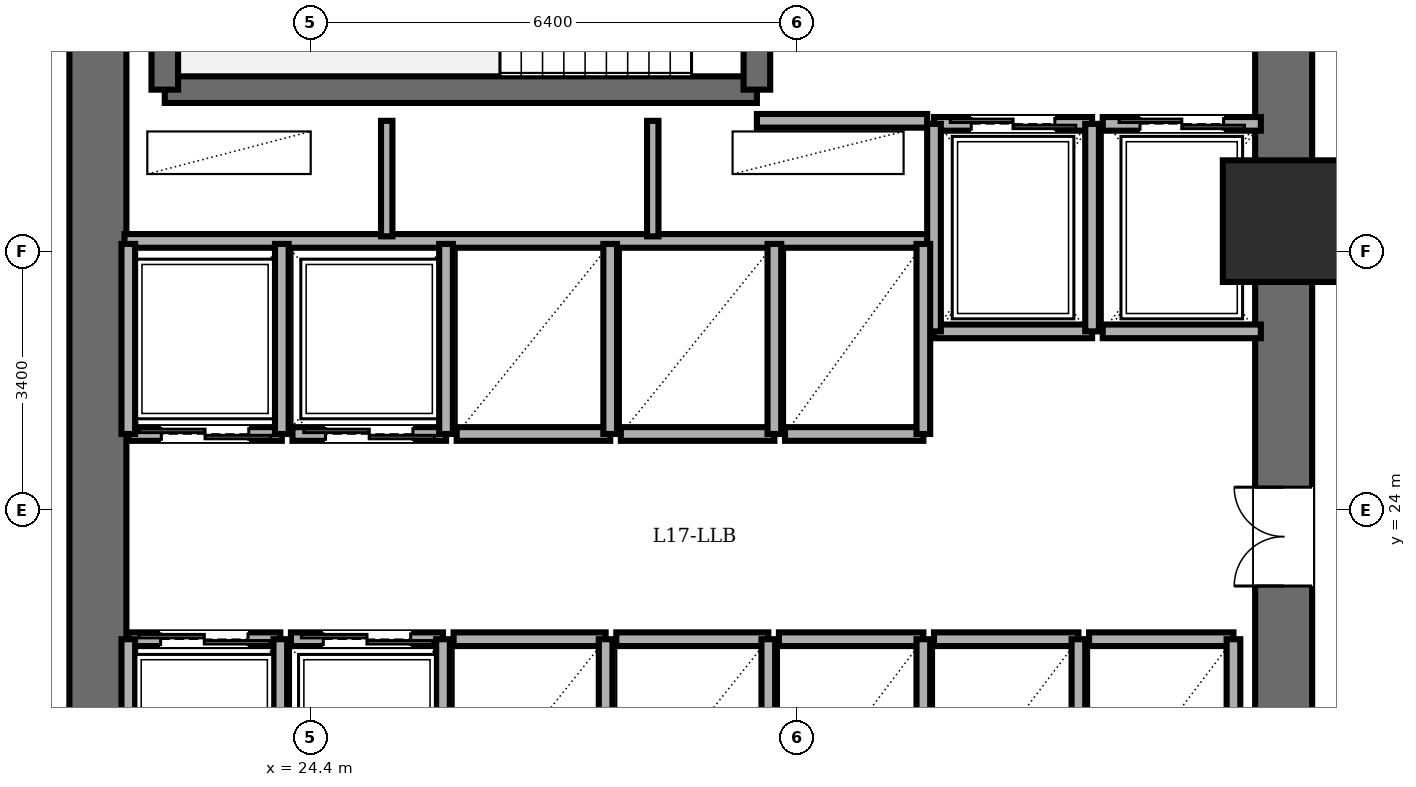
"""IFC4 building model, lengths in metres.
Left out: names, types, materials, properties, quantities, classifications, styles, units other than length and angle.
Written with IfcOpenShell. Run it as: python <this file> out.ifc"""

import sys

from ifc_helpers import new_model, si_unit, direction, frame, frame_2d, origin, origin_2d, place, context, subcontext, project, spatial, rectangle, extrude, element, fill, save


model = new_model("IFC4")
c1 = context("Model", 3, precision=1e-05, world=origin(), true_north=direction((0.0, 1.0)))
c2 = subcontext(c1, "Body", "Model", "MODEL_VIEW")
j1 = project(units=[si_unit("LENGTHUNIT", "METRE"), si_unit("PLANEANGLEUNIT", "RADIAN")], contexts=[c1])
p1 = place(None, origin())
s1 = spatial("IfcSite", under=j1, at=p1, CompositionType="ELEMENT")
p2 = place(p1, origin())
s2 = spatial("IfcBuilding", under=s1, at=p2, CompositionType="ELEMENT")
p3 = place(p2, frame((0.0, 0.0, 64.8)))
s3 = spatial("IfcBuildingStorey", under=s2, at=p3, CompositionType="ELEMENT", Elevation=64.8)
p4 = place(p3, frame((37.2, 27.8, 0.0), z_axis=(0.0, 0.0, 1.0), x_axis=(1.0, 0.0, 0.0)))
e1 = element("IfcColumn", 1, at=p4, inside=s3, PredefinedType="COLUMN", context=c2, shape_type="SweptSolid", body=[
    extrude(rectangle(XDim=1.6, YDim=1.6, at=origin_2d()), origin(), (0.0, 0.0, 1.0), 3.6),
])
p5 = place(p3, frame((21.6, 14.4, 0.0), z_axis=(0.0, 0.0, 1.0), x_axis=(0.0, 1.0, 0.0)))
e2 = element("IfcWall", 2, at=p5, inside=s3, PredefinedType="SHEAR", context=c2, shape_type="SweptSolid", body=[
    extrude(rectangle(XDim=19.2, YDim=0.75, at=frame_2d((9.6, 0.0))), origin(), (0.0, 0.0, 1.0), 3.4),
])
p6 = place(p3, frame((37.2, 14.4, 0.0), z_axis=(0.0, 0.0, 1.0), x_axis=(0.0, 1.0, 0.0)))
e3 = element("IfcWall", 3, at=p6, inside=s3, PredefinedType="SHEAR", context=c2, shape_type="SweptSolid", body=[
    extrude(rectangle(XDim=19.2, YDim=0.75, at=frame_2d((9.6, 0.0))), origin(), (0.0, 0.0, 1.0), 3.4),
])
p7 = place(p6, frame((15.8, 0.0, 0.0)))
e4 = element("IfcOpeningElement", 4, at=p7, cuts=e3, PredefinedType="OPENING", context=c2, shape_type="SweptSolid", body=[
    extrude(rectangle(XDim=1.15, YDim=2.15, at=frame_2d((0.575, 1.075))), frame((0.0, 0.385, 0.0), z_axis=(0.0, -1.0, 0.0), x_axis=(1.0, 0.0, 0.0)), (0.0, 0.0, 1.0), 0.77),
])
p8 = place(p6, frame((3.6, 0.0, 0.0)))
e5 = element("IfcOpeningElement", 5, at=p8, cuts=e3, PredefinedType="OPENING", context=c2, shape_type="SweptSolid", body=[
    extrude(rectangle(XDim=1.1, YDim=2.15, at=frame_2d((0.55, 1.075))), frame((0.0, 0.385, 0.0), z_axis=(0.0, -1.0, 0.0), x_axis=(1.0, 0.0, 0.0)), (0.0, 0.0, 1.0), 0.77),
])
p9 = place(p6, frame((8.6, 0.0, 0.0)))
e6 = element("IfcOpeningElement", 6, at=p9, cuts=e3, PredefinedType="OPENING", context=c2, shape_type="SweptSolid", body=[
    extrude(rectangle(XDim=1.3, YDim=2.2, at=frame_2d((0.65, 1.1))), frame((0.0, 0.385, 0.0), z_axis=(0.0, -1.0, 0.0), x_axis=(1.0, 0.0, 0.0)), (0.0, 0.0, 1.0), 0.77),
])
p10 = place(p3, frame((22.48, 29.53, 0.0), z_axis=(0.0, 0.0, 1.0), x_axis=(1.0, 0.0, 0.0)))
e7 = element("IfcWall", 7, at=p10, inside=s3, PredefinedType="SOLIDWALL", context=c2, shape_type="SweptSolid", body=[
    extrude(rectangle(XDim=7.79, YDim=0.35, at=frame_2d((3.895, 0.0))), origin(), (0.0, 0.0, 1.0), 3.4),
])
p11 = place(p3, frame((22.48, 29.53, 0.0), z_axis=(0.0, 0.0, 1.0), x_axis=(0.0, 1.0, 0.0)))
e8 = element("IfcWall", 8, at=p11, inside=s3, PredefinedType="SOLIDWALL", context=c2, shape_type="SweptSolid", body=[
    extrude(rectangle(XDim=3.58, YDim=0.35, at=frame_2d((1.79, 0.0))), origin(), (0.0, 0.0, 1.0), 3.4),
])
p12 = place(p3, frame((30.27, 29.53, 0.0), z_axis=(0.0, 0.0, 1.0), x_axis=(0.0, 1.0, 0.0)))
e9 = element("IfcWall", 9, at=p12, inside=s3, PredefinedType="SOLIDWALL", context=c2, shape_type="SweptSolid", body=[
    extrude(rectangle(XDim=3.58, YDim=0.35, at=frame_2d((1.79, 0.0))), origin(), (0.0, 0.0, 1.0), 3.4),
])
p13 = place(p12, frame((1.25, 0.0, 0.0)))
e10 = element("IfcOpeningElement", 10, at=p13, cuts=e9, PredefinedType="OPENING", context=c2, shape_type="SweptSolid", body=[
    extrude(rectangle(XDim=1.1, YDim=2.15, at=frame_2d((0.55, 1.075))), frame((0.0, 0.185, 0.0), z_axis=(0.0, -1.0, 0.0), x_axis=(1.0, 0.0, 0.0)), (0.0, 0.0, 1.0), 0.37),
])
p14 = place(p3, frame((30.27, 29.12, 0.0), z_axis=(0.0, 0.0, 1.0), x_axis=(1.0, 0.0, 0.0)))
e11 = element("IfcWall", 11, at=p14, inside=s3, PredefinedType="PARTITIONING", context=c2, shape_type="SweptSolid", body=[
    extrude(rectangle(XDim=2.24, YDim=0.18, at=frame_2d((1.12, 0.0))), origin(), (0.0, 0.0, 1.0), 3.4),
])
p15 = place(p3, frame((21.95, 27.54, 0.0), z_axis=(0.0, 0.0, 1.0), x_axis=(1.0, 0.0, 0.0)))
e12 = element("IfcWall", 12, at=p15, inside=s3, PredefinedType="PARTITIONING", context=c2, shape_type="SweptSolid", body=[
    extrude(rectangle(XDim=10.56, YDim=0.18, at=frame_2d((5.28, 0.0))), origin(), (0.0, 0.0, 1.0), 3.4),
])
for number, where, z_axis, x_axis in (
    (13, (25.4, 27.6, 0.0), (0.0, 0.0, 1.0), (0.0, 1.0, 0.0)),
    (14, (28.9, 27.6, 0.0), (0.0, 0.0, 1.0), (0.0, 1.0, 0.0)),
):
    element("IfcWall", number, at=place(p3, frame(where, z_axis=z_axis, x_axis=x_axis)), inside=s3, PredefinedType="PARTITIONING", context=c2, shape_type="SweptSolid", body=[
        extrude(rectangle(XDim=1.52, YDim=0.15, at=frame_2d((0.76, 0.0))), origin(), (0.0, 0.0, 1.0), 3.4),
    ])
p16 = place(p3, frame((32.6, 29.08, 0.0), z_axis=(0.0, 0.0, 1.0), x_axis=(1.0, 0.0, 0.0)))
e15 = element("IfcWall", 15, at=p16, inside=s3, PredefinedType="PARTITIONING", context=c2, shape_type="SweptSolid", body=[
    extrude(rectangle(XDim=2.08, YDim=0.18, at=frame_2d((1.04, 0.0))), origin(), (0.0, 0.0, 1.0), 3.4),
])
p17 = place(p16, frame((0.49, 0.0, 0.0)))
e16 = element("IfcOpeningElement", 16, at=p17, cuts=e15, PredefinedType="OPENING", context=c2, shape_type="SweptSolid", body=[
    extrude(rectangle(XDim=1.1, YDim=2.2, at=frame_2d((0.55, 1.1))), frame((0.0, 0.1, 0.0), z_axis=(0.0, -1.0, 0.0), x_axis=(1.0, 0.0, 0.0)), (0.0, 0.0, 1.0), 0.2),
])
p18 = place(p3, frame((34.68, 26.35, 0.0), z_axis=(0.0, 0.0, 1.0), x_axis=(-1.0, 0.0, 0.0)))
e17 = element("IfcWall", 17, at=p18, inside=s3, PredefinedType="PARTITIONING", context=c2, shape_type="SweptSolid", body=[
    extrude(rectangle(XDim=2.08, YDim=0.18, at=frame_2d((1.04, 0.0))), origin(), (0.0, 0.0, 1.0), 3.4),
])
for number, where, z_axis, x_axis in (
    (18, (34.68, 26.35, 0.0), (0.0, 0.0, 1.0), (0.0, 1.0, 0.0)),
    (19, (32.6, 29.08, 0.0), (0.0, 0.0, 1.0), (0.0, -1.0, 0.0)),
):
    element("IfcWall", number, at=place(p3, frame(where, z_axis=z_axis, x_axis=x_axis)), inside=s3, PredefinedType="PARTITIONING", context=c2, shape_type="SweptSolid", body=[
        extrude(rectangle(XDim=2.73, YDim=0.18, at=frame_2d((1.365, 0.0))), origin(), (0.0, 0.0, 1.0), 3.4),
    ])
p19 = place(p3, frame((34.82, 29.08, 0.0), z_axis=(0.0, 0.0, 1.0), x_axis=(1.0, 0.0, 0.0)))
e20 = element("IfcWall", 20, at=p19, inside=s3, PredefinedType="PARTITIONING", context=c2, shape_type="SweptSolid", body=[
    extrude(rectangle(XDim=2.08, YDim=0.18, at=frame_2d((1.04, 0.0))), origin(), (0.0, 0.0, 1.0), 3.4),
])
p20 = place(p19, frame((0.49, 0.0, 0.0)))
e21 = element("IfcOpeningElement", 21, at=p20, cuts=e20, PredefinedType="OPENING", context=c2, shape_type="SweptSolid", body=[
    extrude(rectangle(XDim=1.1, YDim=2.2, at=frame_2d((0.55, 1.1))), frame((0.0, 0.1, 0.0), z_axis=(0.0, -1.0, 0.0), x_axis=(1.0, 0.0, 0.0)), (0.0, 0.0, 1.0), 0.2),
])
p21 = place(p3, frame((36.9, 26.35, 0.0), z_axis=(0.0, 0.0, 1.0), x_axis=(-1.0, 0.0, 0.0)))
e22 = element("IfcWall", 22, at=p21, inside=s3, PredefinedType="PARTITIONING", context=c2, shape_type="SweptSolid", body=[
    extrude(rectangle(XDim=2.08, YDim=0.18, at=frame_2d((1.04, 0.0))), origin(), (0.0, 0.0, 1.0), 3.4),
])
p22 = place(p3, frame((24.02, 25.0, 0.0), z_axis=(0.0, 0.0, 1.0), x_axis=(-1.0, 0.0, 0.0)))
e23 = element("IfcWall", 23, at=p22, inside=s3, PredefinedType="PARTITIONING", context=c2, shape_type="SweptSolid", body=[
    extrude(rectangle(XDim=2.02, YDim=0.18, at=frame_2d((1.01, 0.0))), origin(), (0.0, 0.0, 1.0), 3.4),
])
p23 = place(p22, frame((0.435, 0.0, 0.0)))
e24 = element("IfcOpeningElement", 24, at=p23, cuts=e23, PredefinedType="OPENING", context=c2, shape_type="SweptSolid", body=[
    extrude(rectangle(XDim=1.15, YDim=2.2, at=frame_2d((0.575, 1.1))), frame((0.0, 0.1, 0.0), z_axis=(0.0, -1.0, 0.0), x_axis=(1.0, 0.0, 0.0)), (0.0, 0.0, 1.0), 0.2),
])
for number, where, z_axis, x_axis in (
    (25, (24.02, 25.0, 0.0), (0.0, 0.0, 1.0), (0.0, 1.0, 0.0)),
    (26, (22.0, 27.5, 0.0), (0.0, 0.0, 1.0), (0.0, -1.0, 0.0)),
):
    element("IfcWall", number, at=place(p3, frame(where, z_axis=z_axis, x_axis=x_axis)), inside=s3, PredefinedType="PARTITIONING", context=c2, shape_type="SweptSolid", body=[
        extrude(rectangle(XDim=2.5, YDim=0.18, at=frame_2d((1.25, 0.0))), origin(), (0.0, 0.0, 1.0), 3.4),
    ])
p24 = place(p3, frame((26.18, 25.0, 0.0), z_axis=(0.0, 0.0, 1.0), x_axis=(-1.0, 0.0, 0.0)))
e27 = element("IfcWall", 27, at=p24, inside=s3, PredefinedType="PARTITIONING", context=c2, shape_type="SweptSolid", body=[
    extrude(rectangle(XDim=2.02, YDim=0.18, at=frame_2d((1.01, 0.0))), origin(), (0.0, 0.0, 1.0), 3.4),
])
p25 = place(p24, frame((0.435, 0.0, 0.0)))
e28 = element("IfcOpeningElement", 28, at=p25, cuts=e27, PredefinedType="OPENING", context=c2, shape_type="SweptSolid", body=[
    extrude(rectangle(XDim=1.15, YDim=2.2, at=frame_2d((0.575, 1.1))), frame((0.0, 0.1, 0.0), z_axis=(0.0, -1.0, 0.0), x_axis=(1.0, 0.0, 0.0)), (0.0, 0.0, 1.0), 0.2),
])
p26 = place(p3, frame((26.18, 25.0, 0.0), z_axis=(0.0, 0.0, 1.0), x_axis=(0.0, 1.0, 0.0)))
e29 = element("IfcWall", 29, at=p26, inside=s3, PredefinedType="PARTITIONING", context=c2, shape_type="SweptSolid", body=[
    extrude(rectangle(XDim=2.5, YDim=0.18, at=frame_2d((1.25, 0.0))), origin(), (0.0, 0.0, 1.0), 3.4),
])
p27 = place(p3, frame((22.0, 22.3, 0.0), z_axis=(0.0, 0.0, 1.0), x_axis=(1.0, 0.0, 0.0)))
e30 = element("IfcWall", 30, at=p27, inside=s3, PredefinedType="PARTITIONING", context=c2, shape_type="SweptSolid", body=[
    extrude(rectangle(XDim=2.0, YDim=0.18, at=frame_2d((1.0, 0.0))), origin(), (0.0, 0.0, 1.0), 3.4),
])
p28 = place(p27, frame((0.425, 0.0, 0.0)))
e31 = element("IfcOpeningElement", 31, at=p28, cuts=e30, PredefinedType="OPENING", context=c2, shape_type="SweptSolid", body=[
    extrude(rectangle(XDim=1.15, YDim=2.2, at=frame_2d((0.575, 1.1))), frame((0.0, 0.1, 0.0), z_axis=(0.0, -1.0, 0.0), x_axis=(1.0, 0.0, 0.0)), (0.0, 0.0, 1.0), 0.2),
])
for number, where, z_axis, x_axis in (
    (32, (24.0, 19.8, 0.0), (0.0, 0.0, 1.0), (0.0, 1.0, 0.0)),
    (33, (22.0, 22.3, 0.0), (0.0, 0.0, 1.0), (0.0, -1.0, 0.0)),
):
    element("IfcWall", number, at=place(p3, frame(where, z_axis=z_axis, x_axis=x_axis)), inside=s3, PredefinedType="PARTITIONING", context=c2, shape_type="SweptSolid", body=[
        extrude(rectangle(XDim=2.5, YDim=0.18, at=frame_2d((1.25, 0.0))), origin(), (0.0, 0.0, 1.0), 3.4),
    ])
p29 = place(p3, frame((24.14, 22.3, 0.0), z_axis=(0.0, 0.0, 1.0), x_axis=(1.0, 0.0, 0.0)))
e34 = element("IfcWall", 34, at=p29, inside=s3, PredefinedType="PARTITIONING", context=c2, shape_type="SweptSolid", body=[
    extrude(rectangle(XDim=2.0, YDim=0.18, at=frame_2d((1.0, 0.0))), origin(), (0.0, 0.0, 1.0), 3.4),
])
p30 = place(p29, frame((0.425, 0.0, 0.0)))
e35 = element("IfcOpeningElement", 35, at=p30, cuts=e34, PredefinedType="OPENING", context=c2, shape_type="SweptSolid", body=[
    extrude(rectangle(XDim=1.15, YDim=2.2, at=frame_2d((0.575, 1.1))), frame((0.0, 0.1, 0.0), z_axis=(0.0, -1.0, 0.0), x_axis=(1.0, 0.0, 0.0)), (0.0, 0.0, 1.0), 0.2),
])
p31 = place(p3, frame((26.14, 19.8, 0.0), z_axis=(0.0, 0.0, 1.0), x_axis=(0.0, 1.0, 0.0)))
e36 = element("IfcWall", 36, at=p31, inside=s3, PredefinedType="PARTITIONING", context=c2, shape_type="SweptSolid", body=[
    extrude(rectangle(XDim=2.5, YDim=0.18, at=frame_2d((1.25, 0.0))), origin(), (0.0, 0.0, 1.0), 3.4),
])
p32 = place(p3, frame((28.34, 25.0, 0.0), z_axis=(0.0, 0.0, 1.0), x_axis=(-1.0, 0.0, 0.0)))
e37 = element("IfcWall", 37, at=p32, inside=s3, PredefinedType="PARTITIONING", context=c2, shape_type="SweptSolid", body=[
    extrude(rectangle(XDim=2.02, YDim=0.18, at=frame_2d((1.01, 0.0))), origin(), (0.0, 0.0, 1.0), 3.4),
])
p33 = place(p3, frame((28.34, 25.0, 0.0), z_axis=(0.0, 0.0, 1.0), x_axis=(0.0, 1.0, 0.0)))
e38 = element("IfcWall", 38, at=p33, inside=s3, PredefinedType="PARTITIONING", context=c2, shape_type="SweptSolid", body=[
    extrude(rectangle(XDim=2.5, YDim=0.18, at=frame_2d((1.25, 0.0))), origin(), (0.0, 0.0, 1.0), 3.4),
])
p34 = place(p3, frame((30.5, 25.0, 0.0), z_axis=(0.0, 0.0, 1.0), x_axis=(-1.0, 0.0, 0.0)))
e39 = element("IfcWall", 39, at=p34, inside=s3, PredefinedType="PARTITIONING", context=c2, shape_type="SweptSolid", body=[
    extrude(rectangle(XDim=2.02, YDim=0.18, at=frame_2d((1.01, 0.0))), origin(), (0.0, 0.0, 1.0), 3.4),
])
p35 = place(p3, frame((30.5, 25.0, 0.0), z_axis=(0.0, 0.0, 1.0), x_axis=(0.0, 1.0, 0.0)))
e40 = element("IfcWall", 40, at=p35, inside=s3, PredefinedType="PARTITIONING", context=c2, shape_type="SweptSolid", body=[
    extrude(rectangle(XDim=2.5, YDim=0.18, at=frame_2d((1.25, 0.0))), origin(), (0.0, 0.0, 1.0), 3.4),
])
p36 = place(p3, frame((26.28, 22.3, 0.0), z_axis=(0.0, 0.0, 1.0), x_axis=(1.0, 0.0, 0.0)))
e41 = element("IfcWall", 41, at=p36, inside=s3, PredefinedType="PARTITIONING", context=c2, shape_type="SweptSolid", body=[
    extrude(rectangle(XDim=2.0, YDim=0.18, at=frame_2d((1.0, 0.0))), origin(), (0.0, 0.0, 1.0), 3.4),
])
p37 = place(p3, frame((28.28, 19.8, 0.0), z_axis=(0.0, 0.0, 1.0), x_axis=(0.0, 1.0, 0.0)))
e42 = element("IfcWall", 42, at=p37, inside=s3, PredefinedType="PARTITIONING", context=c2, shape_type="SweptSolid", body=[
    extrude(rectangle(XDim=2.5, YDim=0.18, at=frame_2d((1.25, 0.0))), origin(), (0.0, 0.0, 1.0), 3.4),
])
p38 = place(p3, frame((28.42, 22.3, 0.0), z_axis=(0.0, 0.0, 1.0), x_axis=(1.0, 0.0, 0.0)))
e43 = element("IfcWall", 43, at=p38, inside=s3, PredefinedType="PARTITIONING", context=c2, shape_type="SweptSolid", body=[
    extrude(rectangle(XDim=2.0, YDim=0.18, at=frame_2d((1.0, 0.0))), origin(), (0.0, 0.0, 1.0), 3.4),
])
p39 = place(p3, frame((30.42, 19.8, 0.0), z_axis=(0.0, 0.0, 1.0), x_axis=(0.0, 1.0, 0.0)))
e44 = element("IfcWall", 44, at=p39, inside=s3, PredefinedType="PARTITIONING", context=c2, shape_type="SweptSolid", body=[
    extrude(rectangle(XDim=2.5, YDim=0.18, at=frame_2d((1.25, 0.0))), origin(), (0.0, 0.0, 1.0), 3.4),
])
p40 = place(p3, frame((32.46, 25.0, 0.0), z_axis=(0.0, 0.0, 1.0), x_axis=(-1.0, 0.0, 0.0)))
e45 = element("IfcWall", 45, at=p40, inside=s3, PredefinedType="PARTITIONING", context=c2, shape_type="SweptSolid", body=[
    extrude(rectangle(XDim=1.82, YDim=0.18, at=frame_2d((0.91, 0.0))), origin(), (0.0, 0.0, 1.0), 3.4),
])
p41 = place(p3, frame((32.46, 25.0, 0.0), z_axis=(0.0, 0.0, 1.0), x_axis=(0.0, 1.0, 0.0)))
e46 = element("IfcWall", 46, at=p41, inside=s3, PredefinedType="PARTITIONING", context=c2, shape_type="SweptSolid", body=[
    extrude(rectangle(XDim=2.5, YDim=0.18, at=frame_2d((1.25, 0.0))), origin(), (0.0, 0.0, 1.0), 3.4),
])
p42 = place(p3, frame((30.56, 22.3, 0.0), z_axis=(0.0, 0.0, 1.0), x_axis=(1.0, 0.0, 0.0)))
e47 = element("IfcWall", 47, at=p42, inside=s3, PredefinedType="PARTITIONING", context=c2, shape_type="SweptSolid", body=[
    extrude(rectangle(XDim=1.9, YDim=0.18, at=frame_2d((0.95, 0.0))), origin(), (0.0, 0.0, 1.0), 3.4),
])
p43 = place(p3, frame((32.46, 19.8, 0.0), z_axis=(0.0, 0.0, 1.0), x_axis=(0.0, 1.0, 0.0)))
e48 = element("IfcWall", 48, at=p43, inside=s3, PredefinedType="PARTITIONING", context=c2, shape_type="SweptSolid", body=[
    extrude(rectangle(XDim=2.5, YDim=0.18, at=frame_2d((1.25, 0.0))), origin(), (0.0, 0.0, 1.0), 3.4),
])
p44 = place(p3, frame((32.6, 22.3, 0.0), z_axis=(0.0, 0.0, 1.0), x_axis=(1.0, 0.0, 0.0)))
e49 = element("IfcWall", 49, at=p44, inside=s3, PredefinedType="PARTITIONING", context=c2, shape_type="SweptSolid", body=[
    extrude(rectangle(XDim=1.9, YDim=0.18, at=frame_2d((0.95, 0.0))), origin(), (0.0, 0.0, 1.0), 3.4),
])
p45 = place(p3, frame((34.5, 19.8, 0.0), z_axis=(0.0, 0.0, 1.0), x_axis=(0.0, 1.0, 0.0)))
e50 = element("IfcWall", 50, at=p45, inside=s3, PredefinedType="PARTITIONING", context=c2, shape_type="SweptSolid", body=[
    extrude(rectangle(XDim=2.5, YDim=0.18, at=frame_2d((1.25, 0.0))), origin(), (0.0, 0.0, 1.0), 3.4),
])
p46 = place(p3, frame((34.64, 22.3, 0.0), z_axis=(0.0, 0.0, 1.0), x_axis=(1.0, 0.0, 0.0)))
e51 = element("IfcWall", 51, at=p46, inside=s3, PredefinedType="PARTITIONING", context=c2, shape_type="SweptSolid", body=[
    extrude(rectangle(XDim=1.9, YDim=0.18, at=frame_2d((0.95, 0.0))), origin(), (0.0, 0.0, 1.0), 3.4),
])
p47 = place(p3, frame((36.54, 19.8, 0.0), z_axis=(0.0, 0.0, 1.0), x_axis=(0.0, 1.0, 0.0)))
e52 = element("IfcWall", 52, at=p47, inside=s3, PredefinedType="PARTITIONING", context=c2, shape_type="SweptSolid", body=[
    extrude(rectangle(XDim=2.5, YDim=0.18, at=frame_2d((1.25, 0.0))), origin(), (0.0, 0.0, 1.0), 3.4),
])
p48 = place(p17, origin())
e53 = element("IfcDoor", 53, at=p48, inside=s3, OperationType="DOUBLE_DOOR_SLIDING", PredefinedType="DOOR", context=c2, shape_type="SweptSolid", body=[
    extrude(rectangle(XDim=1.1, YDim=2.2, at=frame_2d((0.55, 1.1))), frame((0.0, 0.025, 0.0), z_axis=(0.0, -1.0, 0.0), x_axis=(1.0, 0.0, 0.0)), (0.0, 0.0, 1.0), 0.05),
])
fill(e16, e53)
p49 = place(p20, origin())
e54 = element("IfcDoor", 54, at=p49, inside=s3, OperationType="DOUBLE_DOOR_SLIDING", PredefinedType="DOOR", context=c2, shape_type="SweptSolid", body=[
    extrude(rectangle(XDim=1.1, YDim=2.2, at=frame_2d((0.55, 1.1))), frame((0.0, 0.025, 0.0), z_axis=(0.0, -1.0, 0.0), x_axis=(1.0, 0.0, 0.0)), (0.0, 0.0, 1.0), 0.05),
])
fill(e21, e54)
p50 = place(p23, origin())
e55 = element("IfcDoor", 55, at=p50, inside=s3, OperationType="DOUBLE_DOOR_SLIDING", PredefinedType="DOOR", context=c2, shape_type="SweptSolid", body=[
    extrude(rectangle(XDim=1.15, YDim=2.2, at=frame_2d((0.575, 1.1))), frame((0.0, 0.025, 0.0), z_axis=(0.0, -1.0, 0.0), x_axis=(1.0, 0.0, 0.0)), (0.0, 0.0, 1.0), 0.05),
])
fill(e24, e55)
p51 = place(p25, origin())
e56 = element("IfcDoor", 56, at=p51, inside=s3, OperationType="DOUBLE_DOOR_SLIDING", PredefinedType="DOOR", context=c2, shape_type="SweptSolid", body=[
    extrude(rectangle(XDim=1.15, YDim=2.2, at=frame_2d((0.575, 1.1))), frame((0.0, 0.025, 0.0), z_axis=(0.0, -1.0, 0.0), x_axis=(1.0, 0.0, 0.0)), (0.0, 0.0, 1.0), 0.05),
])
fill(e28, e56)
p52 = place(p28, origin())
e57 = element("IfcDoor", 57, at=p52, inside=s3, OperationType="DOUBLE_DOOR_SLIDING", PredefinedType="DOOR", context=c2, shape_type="SweptSolid", body=[
    extrude(rectangle(XDim=1.15, YDim=2.2, at=frame_2d((0.575, 1.1))), frame((0.0, 0.025, 0.0), z_axis=(0.0, -1.0, 0.0), x_axis=(1.0, 0.0, 0.0)), (0.0, 0.0, 1.0), 0.05),
])
fill(e31, e57)
p53 = place(p30, origin())
e58 = element("IfcDoor", 58, at=p53, inside=s3, OperationType="DOUBLE_DOOR_SLIDING", PredefinedType="DOOR", context=c2, shape_type="SweptSolid", body=[
    extrude(rectangle(XDim=1.15, YDim=2.2, at=frame_2d((0.575, 1.1))), frame((0.0, 0.025, 0.0), z_axis=(0.0, -1.0, 0.0), x_axis=(1.0, 0.0, 0.0)), (0.0, 0.0, 1.0), 0.05),
])
fill(e35, e58)
p54 = place(p9, origin())
e59 = element("IfcDoor", 59, at=p54, inside=s3, OperationType="DOUBLE_DOOR_SINGLE_SWING", PredefinedType="DOOR", context=c2, shape_type="SweptSolid", body=[
    extrude(rectangle(XDim=1.3, YDim=2.2, at=frame_2d((0.65, 1.1))), frame((0.0, 0.025, 0.0), z_axis=(0.0, -1.0, 0.0), x_axis=(1.0, 0.0, 0.0)), (0.0, 0.0, 1.0), 0.05),
])
fill(e6, e59)
save(model, sys.argv[1])
